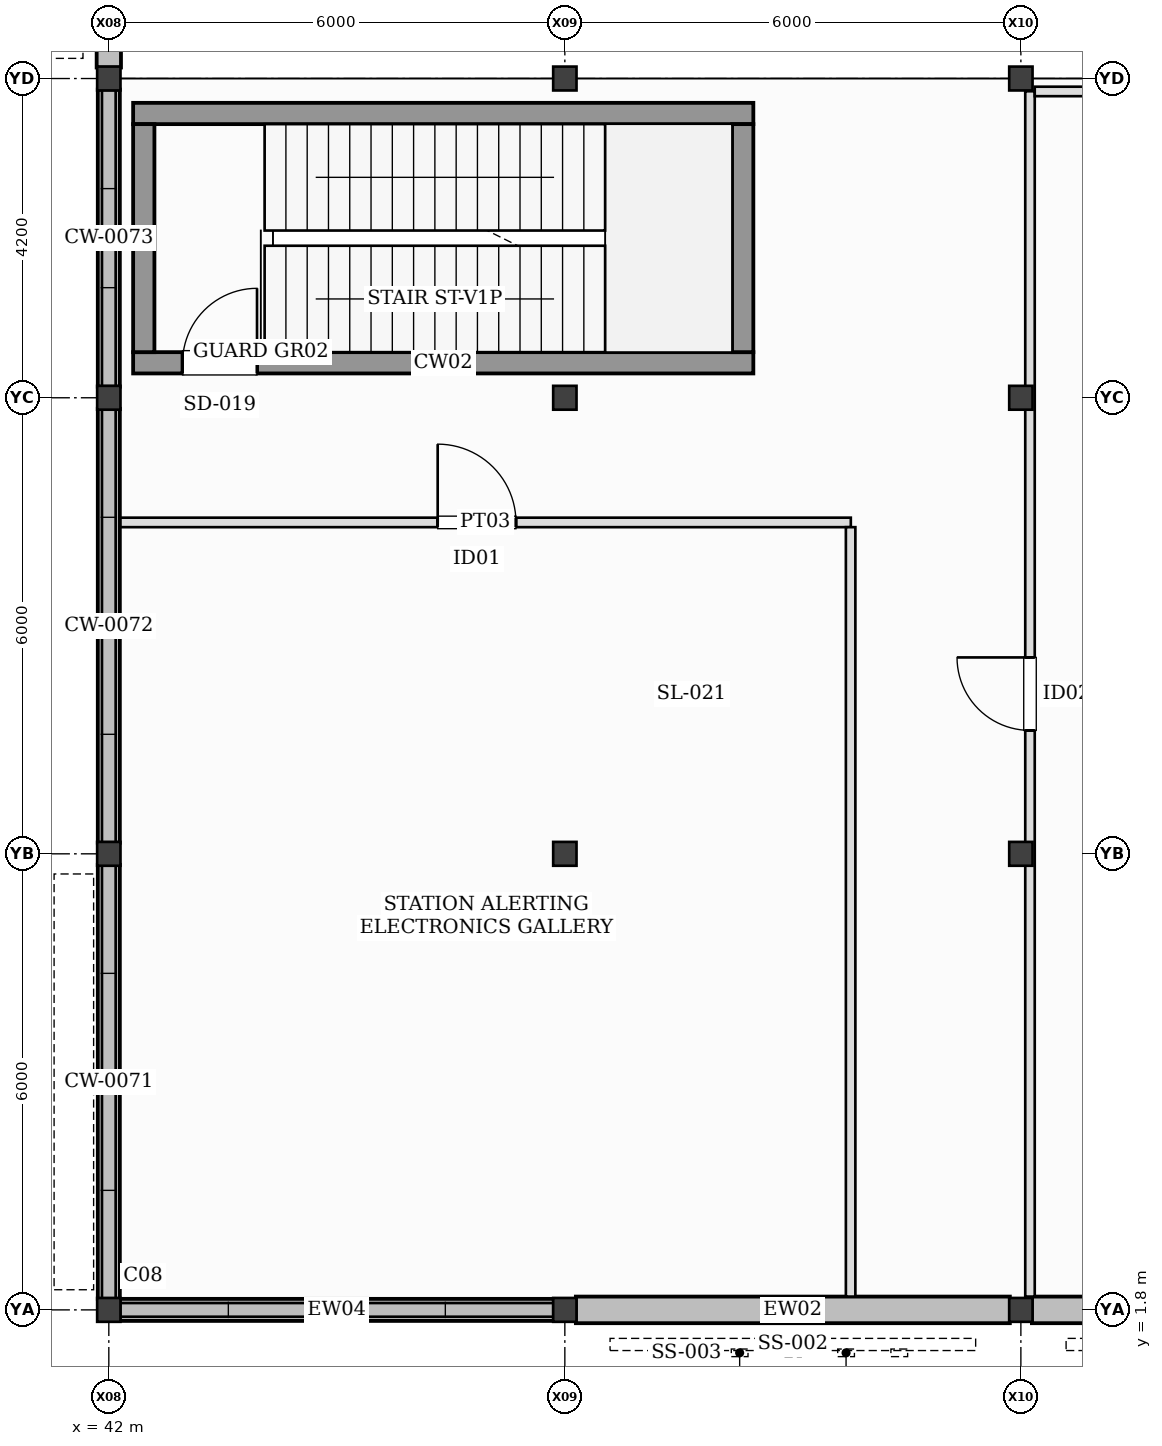
"""IFC4 building model, lengths in metres.
Left out: names, types, materials, properties, quantities, classifications, styles, units other than length and angle.
Written with IfcOpenShell. Run it as: python <this file> out.ifc"""

import sys

from ifc_helpers import new_model, si_unit, direction, frame, frame_2d, origin, origin_2d, place, context, subcontext, project, spatial, rectangle, i_section, extrude, element, fill, save


model = new_model("IFC4")
c1 = context("Model", 3, precision=1e-05, world=origin(), true_north=direction((0.0, 1.0)))
c2 = subcontext(c1, "Body", "Model", "MODEL_VIEW")
j1 = project(units=[si_unit("LENGTHUNIT", "METRE"), si_unit("PLANEANGLEUNIT", "RADIAN")], contexts=[c1])
p1 = place(None, origin())
s1 = spatial("IfcSite", under=j1, at=p1, CompositionType="ELEMENT")
p2 = place(p1, origin())
s2 = spatial("IfcBuilding", under=s1, at=p2, CompositionType="ELEMENT")
p3 = place(p2, frame((0.0, 0.0, 6.0)))
s3 = spatial("IfcBuildingStorey", under=s2, at=p3, CompositionType="ELEMENT", Elevation=6.0)
for number, where, z_axis, x_axis in (
    (1, (42.0, 1.8, 0.0), (0.0, 0.0, 1.0), (1.0, 0.0, 0.0)),
    (2, (42.0, 7.8, 0.0), (0.0, 0.0, 1.0), (1.0, 0.0, 0.0)),
    (3, (42.0, 13.8, 0.0), (0.0, 0.0, 1.0), (1.0, 0.0, 0.0)),
    (4, (42.0, 18.0, 0.0), (0.0, 0.0, 1.0), (1.0, 0.0, 0.0)),
    (5, (48.0, 1.8, 0.0), (0.0, 0.0, 1.0), (1.0, 0.0, 0.0)),
    (6, (48.0, 7.8, 0.0), (0.0, 0.0, 1.0), (1.0, 0.0, 0.0)),
    (7, (48.0, 13.8, 0.0), (0.0, 0.0, 1.0), (1.0, 0.0, 0.0)),
    (8, (48.0, 18.0, 0.0), (0.0, 0.0, 1.0), (1.0, 0.0, 0.0)),
    (9, (54.0, 1.8, 0.0), (0.0, 0.0, 1.0), (1.0, 0.0, 0.0)),
    (10, (54.0, 7.8, 0.0), (0.0, 0.0, 1.0), (1.0, 0.0, 0.0)),
    (11, (54.0, 13.8, 0.0), (0.0, 0.0, 1.0), (1.0, 0.0, 0.0)),
    (12, (54.0, 18.0, 0.0), (0.0, 0.0, 1.0), (1.0, 0.0, 0.0)),
):
    element("IfcColumn", number, at=place(p3, frame(where, z_axis=z_axis, x_axis=x_axis)), inside=s3, PredefinedType="COLUMN", context=c2, shape_type="SweptSolid", body=[
        extrude(i_section(OverallWidth=0.307, OverallDepth=0.314, WebThickness=0.011, FlangeThickness=0.019, at=origin_2d()), origin(), (0.0, 0.0, 1.0), 4.0),
    ])
p4 = place(p3, frame((42.145, 1.8, 0.0), z_axis=(0.0, 0.0, 1.0), x_axis=(1.0, 0.0, 0.0)))
e13 = element("IfcWall", 13, at=p4, inside=s3, PredefinedType="STANDARD", context=c2, shape_type="SweptSolid", body=[
    extrude(rectangle(XDim=5.71, YDim=0.29, at=frame_2d((2.855, 0.0))), origin(), (0.0, 0.0, 1.0), 0.92),
])
for number, where, z_axis, x_axis in (
    (14, (48.145, 1.8, 0.0), (0.0, 0.0, 1.0), (1.0, 0.0, 0.0)),
    (15, (54.145, 1.8, 0.0), (0.0, 0.0, 1.0), (1.0, 0.0, 0.0)),
):
    element("IfcWall", number, at=place(p3, frame(where, z_axis=z_axis, x_axis=x_axis)), inside=s3, PredefinedType="STANDARD", context=c2, shape_type="SweptSolid", body=[
        extrude(rectangle(XDim=5.71, YDim=0.35, at=frame_2d((2.855, 0.0))), origin(), (0.0, 0.0, 1.0), 4.0),
    ])
p5 = place(p3, frame((42.0, 7.655, 0.0), z_axis=(0.0, 0.0, 1.0), x_axis=(0.0, -1.0, 0.0)))
e16 = element("IfcWall", 16, at=p5, inside=s3, PredefinedType="STANDARD", context=c2, shape_type="SweptSolid", body=[
    extrude(rectangle(XDim=5.71, YDim=0.29, at=frame_2d((2.855, 0.0))), origin(), (0.0, 0.0, 1.0), 0.32),
])
p6 = place(p3, frame((42.0, 13.655, 0.0), z_axis=(0.0, 0.0, 1.0), x_axis=(0.0, -1.0, 0.0)))
e17 = element("IfcWall", 17, at=p6, inside=s3, PredefinedType="STANDARD", context=c2, shape_type="SweptSolid", body=[
    extrude(rectangle(XDim=5.71, YDim=0.29, at=frame_2d((2.855, 0.0))), origin(), (0.0, 0.0, 1.0), 0.44),
])
p7 = place(p3, frame((42.0, 17.855, 0.0), z_axis=(0.0, 0.0, 1.0), x_axis=(0.0, -1.0, 0.0)))
e18 = element("IfcWall", 18, at=p7, inside=s3, PredefinedType="STANDARD", context=c2, shape_type="SweptSolid", body=[
    extrude(rectangle(XDim=3.91, YDim=0.29, at=frame_2d((1.955, 0.0))), origin(), (0.0, 0.0, 1.0), 0.56),
])
p8 = place(p3, frame((42.0, 23.855, 0.0), z_axis=(0.0, 0.0, 1.0), x_axis=(0.0, -1.0, 0.0)))
e19 = element("IfcWall", 19, at=p8, inside=s3, PredefinedType="STANDARD", context=c2, shape_type="SweptSolid", body=[
    extrude(rectangle(XDim=5.71, YDim=0.32, at=frame_2d((2.855, 0.0))), origin(), (0.0, 0.0, 1.0), 3.318),
])
p9 = place(p8, frame((0.628, 0.0, 0.86)))
e20 = element("IfcOpeningElement", 20, at=p9, cuts=e19, PredefinedType="OPENING", context=c2, shape_type="SweptSolid", body=[
    extrude(rectangle(XDim=1.44, YDim=1.44, at=frame_2d((0.72, 0.72))), frame((0.0, 0.17, 0.0), z_axis=(0.0, -1.0, 0.0), x_axis=(1.0, 0.0, 0.0)), (0.0, 0.0, 1.0), 0.34),
])
p10 = place(p8, frame((3.894, 0.0, 1.42)))
e21 = element("IfcOpeningElement", 21, at=p10, cuts=e19, PredefinedType="OPENING", context=c2, shape_type="SweptSolid", body=[
    extrude(rectangle(XDim=0.96, YDim=0.96, at=frame_2d((0.48, 0.48))), frame((0.0, 0.17, 0.0), z_axis=(0.0, -1.0, 0.0), x_axis=(1.0, 0.0, 0.0)), (0.0, 0.0, 1.0), 0.34),
])
p11 = place(p3, frame((42.32, 14.26, 0.0), z_axis=(0.0, 0.0, 1.0), x_axis=(1.0, 0.0, 0.0)))
e22 = element("IfcWall", 22, at=p11, inside=s3, PredefinedType="SHEAR", context=c2, shape_type="SweptSolid", body=[
    extrude(rectangle(XDim=8.16, YDim=0.28, at=frame_2d((4.08, 0.0))), origin(), (0.0, 0.0, 1.0), 3.75),
])
p12 = place(p11, frame((0.65, 0.0, 0.0)))
e23 = element("IfcOpeningElement", 23, at=p12, cuts=e22, PredefinedType="OPENING", context=c2, shape_type="SweptSolid", body=[
    extrude(rectangle(XDim=0.98, YDim=2.15, at=frame_2d((0.49, 1.075))), frame((0.0, 0.15, 0.0), z_axis=(0.0, -1.0, 0.0), x_axis=(1.0, 0.0, 0.0)), (0.0, 0.0, 1.0), 0.3),
])
p13 = place(p3, frame((50.48, 17.54, 0.0), z_axis=(0.0, 0.0, 1.0), x_axis=(-1.0, 0.0, 0.0)))
e24 = element("IfcWall", 24, at=p13, inside=s3, PredefinedType="SHEAR", context=c2, shape_type="SweptSolid", body=[
    extrude(rectangle(XDim=8.16, YDim=0.28, at=frame_2d((4.08, 0.0))), origin(), (0.0, 0.0, 1.0), 3.75),
])
for number, where, z_axis, x_axis in (
    (25, (42.46, 17.4, 0.0), (0.0, 0.0, 1.0), (0.0, -1.0, 0.0)),
    (26, (50.34, 14.4, 0.0), (0.0, 0.0, 1.0), (0.0, 1.0, 0.0)),
):
    element("IfcWall", number, at=place(p3, frame(where, z_axis=z_axis, x_axis=x_axis)), inside=s3, PredefinedType="SHEAR", context=c2, shape_type="SweptSolid", body=[
        extrude(rectangle(XDim=3.0, YDim=0.28, at=frame_2d((1.5, 0.0))), origin(), (0.0, 0.0, 1.0), 3.75),
    ])
p14 = place(p3, frame((42.145, 12.16, 0.0), z_axis=(0.0, 0.0, 1.0), x_axis=(1.0, 0.0, 0.0)))
e27 = element("IfcWall", 27, at=p14, inside=s3, PredefinedType="PARTITIONING", context=c2, shape_type="SweptSolid", body=[
    extrude(rectangle(XDim=9.617, YDim=0.125, at=frame_2d((4.809, 0.0))), origin(), (0.0, 0.0, 1.0), 3.72),
])
p15 = place(p14, frame((4.182, 0.0, 0.0)))
e28 = element("IfcOpeningElement", 28, at=p15, cuts=e27, PredefinedType="OPENING", context=c2, shape_type="SweptSolid", body=[
    extrude(rectangle(XDim=1.03, YDim=2.15, at=frame_2d((0.515, 1.075))), frame((0.0, 0.073, 0.0), z_axis=(0.0, -1.0, 0.0), x_axis=(1.0, 0.0, 0.0)), (0.0, 0.0, 1.0), 0.145),
])
p16 = place(p3, frame((51.76, 12.097, 0.0), z_axis=(0.0, 0.0, 1.0), x_axis=(0.0, -1.0, 0.0)))
e29 = element("IfcWall", 29, at=p16, inside=s3, PredefinedType="PARTITIONING", context=c2, shape_type="SweptSolid", body=[
    extrude(rectangle(XDim=10.122, YDim=0.125, at=frame_2d((5.061, 0.0))), origin(), (0.0, 0.0, 1.0), 3.72),
])
p17 = place(p3, frame((54.12, 1.975, 0.0), z_axis=(0.0, 0.0, 1.0), x_axis=(0.0, 1.0, 0.0)))
e30 = element("IfcWall", 30, at=p17, inside=s3, PredefinedType="PARTITIONING", context=c2, shape_type="SweptSolid", body=[
    extrude(rectangle(XDim=15.857, YDim=0.125, at=frame_2d((7.929, 0.0))), origin(), (0.0, 0.0, 1.0), 3.72),
])
p18 = place(p17, frame((7.449, 0.0, 0.0)))
e31 = element("IfcOpeningElement", 31, at=p18, cuts=e30, PredefinedType="OPENING", context=c2, shape_type="SweptSolid", body=[
    extrude(rectangle(XDim=0.96, YDim=2.15, at=frame_2d((0.48, 1.075))), frame((0.0, 0.073, 0.0), z_axis=(0.0, -1.0, 0.0), x_axis=(1.0, 0.0, 0.0)), (0.0, 0.0, 1.0), 0.145),
])
p19 = place(p3, frame((54.183, 17.83, 0.0), z_axis=(0.0, 0.0, 1.0), x_axis=(1.0, 0.0, 0.0)))
e32 = element("IfcWall", 32, at=p19, inside=s3, PredefinedType="PARTITIONING", context=c2, shape_type="SweptSolid", body=[
    extrude(rectangle(XDim=5.642, YDim=0.125, at=frame_2d((2.821, 0.0))), origin(), (0.0, 0.0, 1.0), 3.72),
])
p20 = place(p12, origin())
e33 = element("IfcDoor", 33, at=p20, inside=s3, OperationType="SINGLE_SWING_RIGHT", PredefinedType="DOOR", context=c2, shape_type="SweptSolid", body=[
    extrude(rectangle(XDim=0.98, YDim=2.15, at=frame_2d((0.49, 1.075))), frame((0.0, 0.025, 0.0), z_axis=(0.0, -1.0, 0.0), x_axis=(1.0, 0.0, 0.0)), (0.0, 0.0, 1.0), 0.05),
])
fill(e23, e33)
p21 = place(p15, frame((1.03, 0.0, 0.0), z_axis=(0.0, 0.0, 1.0), x_axis=(-1.0, 0.0, 0.0)))
e34 = element("IfcDoor", 34, at=p21, inside=s3, OperationType="SINGLE_SWING_LEFT", PredefinedType="DOOR", context=c2, shape_type="SweptSolid", body=[
    extrude(rectangle(XDim=1.03, YDim=2.15, at=frame_2d((0.515, 1.075))), frame((0.0, 0.025, 0.0), z_axis=(0.0, -1.0, 0.0), x_axis=(1.0, 0.0, 0.0)), (0.0, 0.0, 1.0), 0.05),
])
fill(e28, e34)
p22 = place(p18, frame((0.96, 0.0, 0.0), z_axis=(0.0, 0.0, 1.0), x_axis=(-1.0, 0.0, 0.0)))
e35 = element("IfcDoor", 35, at=p22, inside=s3, OperationType="SINGLE_SWING_RIGHT", PredefinedType="DOOR", context=c2, shape_type="SweptSolid", body=[
    extrude(rectangle(XDim=0.96, YDim=2.15, at=frame_2d((0.48, 1.075))), frame((0.0, 0.025, 0.0), z_axis=(0.0, -1.0, 0.0), x_axis=(1.0, 0.0, 0.0)), (0.0, 0.0, 1.0), 0.05),
])
fill(e31, e35)
save(model, sys.argv[1])
